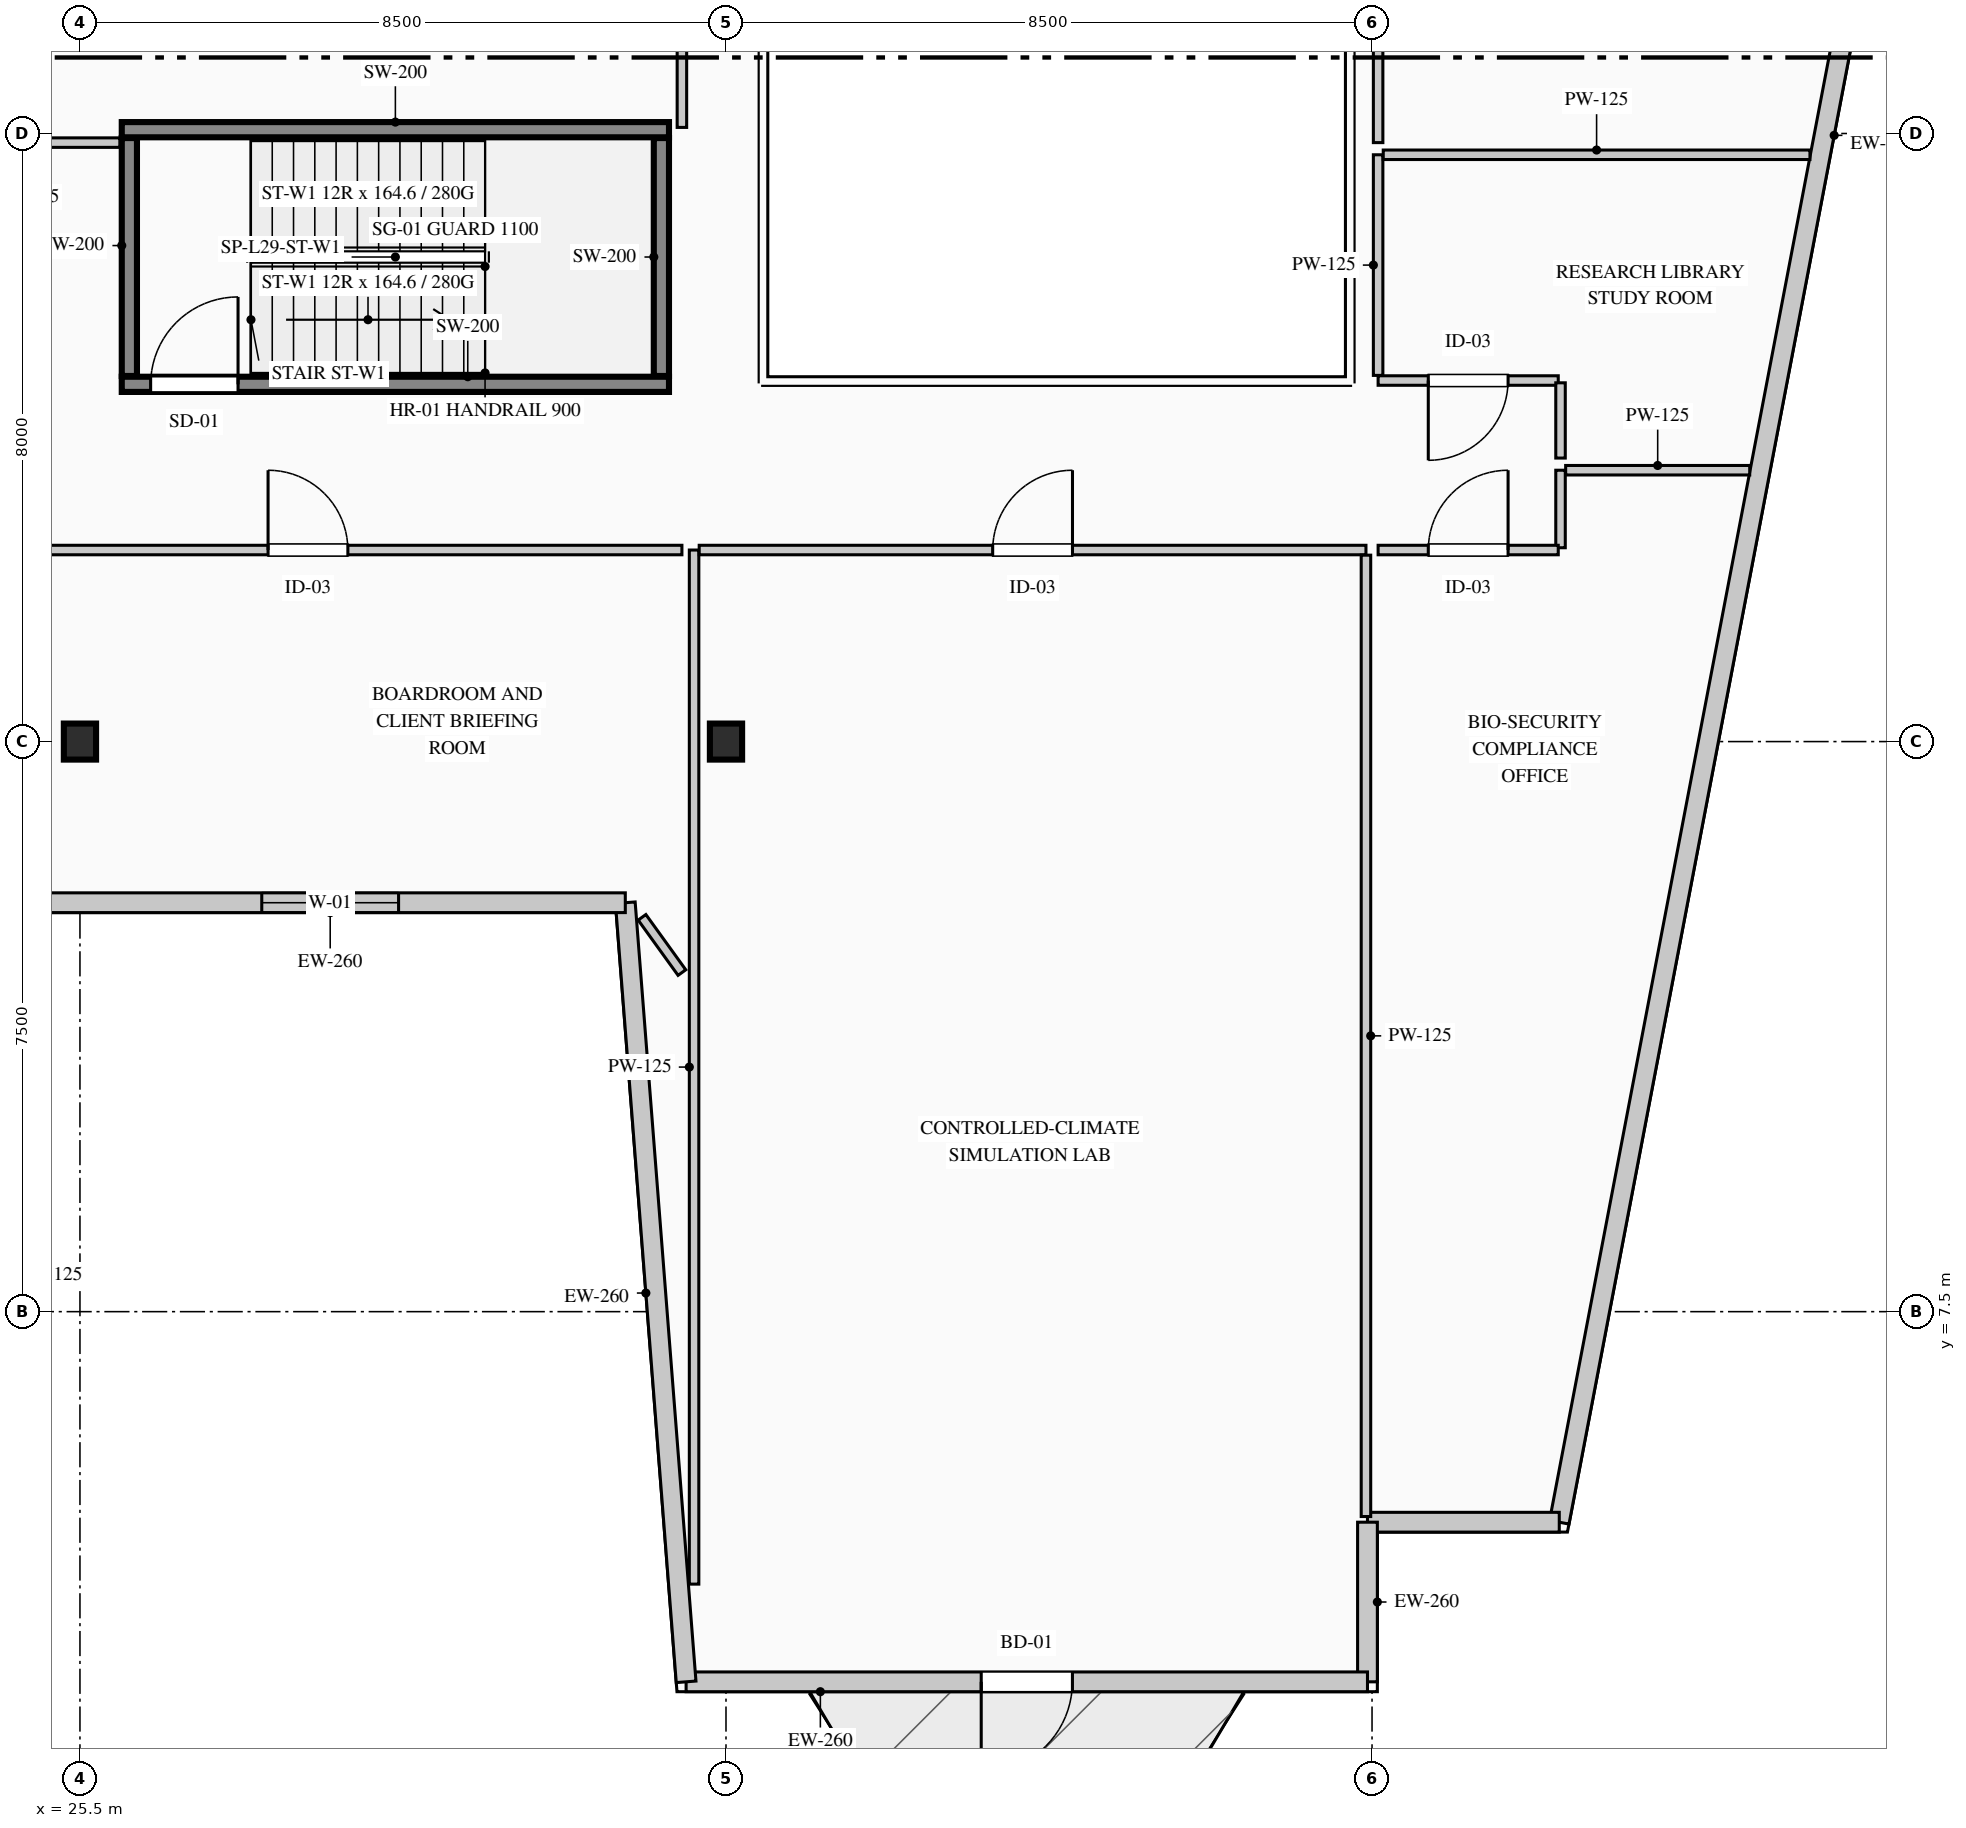
"""IFC4 building model, lengths in metres.
Left out: names, types, materials, properties, quantities, classifications, styles, units other than length and angle.
Written with IfcOpenShell. Run it as: python <this file> out.ifc"""

import sys

from ifc_helpers import new_model, si_unit, direction, frame, frame_2d, origin, origin_2d, place, context, subcontext, project, spatial, rectangle, i_section, extrude, element, fill, save


model = new_model("IFC4")
c1 = context("Model", 3, precision=1e-05, world=origin(), true_north=direction((0.0, 1.0)))
c2 = subcontext(c1, "Body", "Model", "MODEL_VIEW")
j1 = project(units=[si_unit("LENGTHUNIT", "METRE"), si_unit("PLANEANGLEUNIT", "RADIAN")], contexts=[c1])
p1 = place(None, origin())
s1 = spatial("IfcSite", under=j1, at=p1, CompositionType="ELEMENT")
p2 = place(p1, origin())
s2 = spatial("IfcBuilding", under=s1, at=p2, CompositionType="ELEMENT")
p3 = place(p2, frame((0.0, 0.0, 127.2)))
s3 = spatial("IfcBuildingStorey", under=s2, at=p3, CompositionType="ELEMENT", Elevation=127.2)
p4 = place(p3, frame((26.05, 19.7, 0.0), z_axis=(0.0, 0.0, 1.0), x_axis=(1.0, 0.0, 0.0)))
e1 = element("IfcWall", 1, at=p4, inside=s3, PredefinedType="SHEAR", context=c2, shape_type="SweptSolid", body=[
    extrude(rectangle(XDim=7.2, YDim=0.2, at=frame_2d((3.6, 0.0))), origin(), (0.0, 0.0, 1.0), 3.95),
])
p5 = place(p4, frame((0.38, 0.0, 0.0)))
e2 = element("IfcOpeningElement", 2, at=p5, cuts=e1, PredefinedType="OPENING", context=c2, shape_type="SweptSolid", body=[
    extrude(rectangle(XDim=1.15, YDim=2.2, at=frame_2d((0.575, 1.1))), frame((0.0, 0.11, 0.0), z_axis=(0.0, -1.0, 0.0), x_axis=(1.0, 0.0, 0.0)), (0.0, 0.0, 1.0), 0.22),
])
p6 = place(p3, frame((26.05, 23.05, 0.0), z_axis=(0.0, 0.0, 1.0), x_axis=(1.0, 0.0, 0.0)))
e3 = element("IfcWall", 3, at=p6, inside=s3, PredefinedType="SHEAR", context=c2, shape_type="SweptSolid", body=[
    extrude(rectangle(XDim=7.2, YDim=0.2, at=frame_2d((3.6, 0.0))), origin(), (0.0, 0.0, 1.0), 3.95),
])
for number, where, z_axis, x_axis in (
    (4, (26.15, 19.81, 0.0), (0.0, 0.0, 1.0), (0.0, 1.0, 0.0)),
    (5, (33.15, 19.81, 0.0), (0.0, 0.0, 1.0), (0.0, 1.0, 0.0)),
):
    element("IfcWall", number, at=place(p3, frame(where, z_axis=z_axis, x_axis=x_axis)), inside=s3, PredefinedType="SHEAR", context=c2, shape_type="SweptSolid", body=[
        extrude(rectangle(XDim=3.13, YDim=0.2, at=frame_2d((1.565, 0.0))), origin(), (0.0, 0.0, 1.0), 3.95),
    ])
for number, where, z_axis, x_axis in (
    (6, (25.5, 15.0, 0.0), (0.0, 0.0, 1.0), (1.0, 0.0, 0.0)),
    (7, (34.0, 15.0, 0.0), (0.0, 0.0, 1.0), (1.0, 0.0, 0.0)),
):
    element("IfcColumn", number, at=place(p3, frame(where, z_axis=z_axis, x_axis=x_axis)), inside=s3, PredefinedType="COLUMN", context=c2, shape_type="SweptSolid", body=[
        extrude(i_section(OverallWidth=0.424, OverallDepth=0.474, WebThickness=0.048, FlangeThickness=0.077, FilletRadius=0.015, at=origin_2d()), origin(), (0.0, 0.0, 1.0), 3.95),
    ])
p7 = place(p3, frame((51.942, 41.27, 0.0), z_axis=(0.0, 0.0, 1.0), x_axis=(-0.187592192405, -0.982247000173, 0.0)))
e8 = element("IfcWall", 8, at=p7, inside=s3, PredefinedType="STANDARD", context=c2, shape_type="SweptSolid", body=[
    extrude(rectangle(XDim=37.2, YDim=0.26, at=frame_2d((18.6, 0.0))), origin(), (0.0, 0.0, 1.0), 3.69),
])
p8 = place(p7, frame((12.342, 0.0, 0.9)))
e9 = element("IfcOpeningElement", 9, at=p8, cuts=e8, PredefinedType="OPENING", context=c2, shape_type="SweptSolid", body=[
    extrude(rectangle(XDim=2.1, YDim=2.0, at=frame_2d((1.05, 1.0))), frame((0.0, 0.14, 0.0), z_axis=(0.0, -1.0, 0.0), x_axis=(1.0, 0.0, 0.0)), (0.0, 0.0, 1.0), 0.28),
])
p9 = place(p3, frame((44.963, 4.73, 0.0), z_axis=(0.0, 0.0, 1.0), x_axis=(-1.0, 0.0, 0.0)))
e10 = element("IfcWall", 10, at=p9, inside=s3, PredefinedType="STANDARD", context=c2, shape_type="SweptSolid", body=[
    extrude(rectangle(XDim=2.523, YDim=0.26, at=frame_2d((1.262, 0.0))), origin(), (0.0, 0.0, 1.0), 3.69),
])
p10 = place(p3, frame((42.44, 4.73, 0.0), z_axis=(0.0, 0.0, 1.0), x_axis=(0.0, -1.0, 0.0)))
e11 = element("IfcWall", 11, at=p10, inside=s3, PredefinedType="STANDARD", context=c2, shape_type="SweptSolid", body=[
    extrude(rectangle(XDim=2.1, YDim=0.26, at=frame_2d((1.05, 0.0))), origin(), (0.0, 0.0, 1.0), 3.69),
])
p11 = place(p3, frame((42.44, 2.63, 0.0), z_axis=(0.0, 0.0, 1.0), x_axis=(-1.0, 0.0, 0.0)))
e12 = element("IfcWall", 12, at=p11, inside=s3, PredefinedType="STANDARD", context=c2, shape_type="SweptSolid", body=[
    extrude(rectangle(XDim=8.965, YDim=0.26, at=frame_2d((4.482, 0.0))), origin(), (0.0, 0.0, 1.0), 3.69),
])
p12 = place(p11, frame((3.882, 0.0, 0.0)))
e13 = element("IfcOpeningElement", 13, at=p12, cuts=e12, PredefinedType="OPENING", context=c2, shape_type="SweptSolid", body=[
    extrude(rectangle(XDim=1.2, YDim=2.2, at=frame_2d((0.6, 1.1))), frame((0.0, 0.14, 0.0), z_axis=(0.0, -1.0, 0.0), x_axis=(1.0, 0.0, 0.0)), (0.0, 0.0, 1.0), 0.28),
])
p13 = place(p3, frame((33.475, 2.63, 0.0), z_axis=(0.0, 0.0, 1.0), x_axis=(-0.077793257511, 0.996969512616, 0.0)))
e14 = element("IfcWall", 14, at=p13, inside=s3, PredefinedType="STANDARD", context=c2, shape_type="SweptSolid", body=[
    extrude(rectangle(XDim=10.281, YDim=0.26, at=frame_2d((5.141, 0.0))), origin(), (0.0, 0.0, 1.0), 3.69),
])
p14 = place(p3, frame((32.675, 12.88, 0.0), z_axis=(0.0, 0.0, 1.0), x_axis=(-1.0, 0.0, 0.0)))
e15 = element("IfcWall", 15, at=p14, inside=s3, PredefinedType="STANDARD", context=c2, shape_type="SweptSolid", body=[
    extrude(rectangle(XDim=7.765, YDim=0.26, at=frame_2d((3.883, 0.0))), origin(), (0.0, 0.0, 1.0), 3.69),
])
p15 = place(p14, frame((2.983, 0.0, 0.9)))
e16 = element("IfcOpeningElement", 16, at=p15, cuts=e15, PredefinedType="OPENING", context=c2, shape_type="SweptSolid", body=[
    extrude(rectangle(XDim=1.8, YDim=2.1, at=frame_2d((0.9, 1.05))), frame((0.0, 0.14, 0.0), z_axis=(0.0, -1.0, 0.0), x_axis=(1.0, 0.0, 0.0)), (0.0, 0.0, 1.0), 0.28),
])
p16 = place(p3, frame((33.58, 3.915, 0.0), z_axis=(0.0, 0.0, 1.0), x_axis=(0.0, 1.0, 0.0)))
e17 = element("IfcWall", 17, at=p16, inside=s3, PredefinedType="PARTITIONING", context=c2, shape_type="SweptSolid", body=[
    extrude(rectangle(XDim=13.605, YDim=0.125, at=frame_2d((6.802, 0.0))), origin(), (0.0, 0.0, 1.0), 3.69),
])
p17 = place(p3, frame((33.647, 17.52, 0.0), z_axis=(0.0, 0.0, 1.0), x_axis=(1.0, 0.0, 0.0)))
e18 = element("IfcWall", 18, at=p17, inside=s3, PredefinedType="PARTITIONING", context=c2, shape_type="SweptSolid", body=[
    extrude(rectangle(XDim=8.772, YDim=0.125, at=frame_2d((4.386, 0.0))), origin(), (0.0, 0.0, 1.0), 3.375),
])
p18 = place(p17, frame((3.861, 0.0, 0.0)))
e19 = element("IfcOpeningElement", 19, at=p18, cuts=e18, PredefinedType="OPENING", context=c2, shape_type="SweptSolid", body=[
    extrude(rectangle(XDim=1.05, YDim=2.15, at=frame_2d((0.525, 1.075))), frame((0.0, 0.073, 0.0), z_axis=(0.0, -1.0, 0.0), x_axis=(1.0, 0.0, 0.0)), (0.0, 0.0, 1.0), 0.145),
])
p19 = place(p3, frame((42.42, 17.452, 0.0), z_axis=(0.0, 0.0, 1.0), x_axis=(0.0, -1.0, 0.0)))
e20 = element("IfcWall", 20, at=p19, inside=s3, PredefinedType="PARTITIONING", context=c2, shape_type="SweptSolid", body=[
    extrude(rectangle(XDim=12.648, YDim=0.125, at=frame_2d((6.324, 0.0))), origin(), (0.0, 0.0, 1.0), 3.69),
])
p20 = place(p3, frame((44.98, 17.55, 0.0), z_axis=(0.0, 0.0, 1.0), x_axis=(0.0, 1.0, 0.0)))
e21 = element("IfcWall", 21, at=p20, inside=s3, PredefinedType="PARTITIONING", context=c2, shape_type="SweptSolid", body=[
    extrude(rectangle(XDim=1.02, YDim=0.125, at=frame_2d((0.51, 0.0))), origin(), (0.0, 0.0, 1.0), 3.69),
])
p21 = place(p3, frame((45.048, 18.57, 0.0), z_axis=(0.0, 0.0, 1.0), x_axis=(1.0, 0.0, 0.0)))
e22 = element("IfcWall", 22, at=p21, inside=s3, PredefinedType="PARTITIONING", context=c2, shape_type="SweptSolid", body=[
    extrude(rectangle(XDim=2.422, YDim=0.125, at=frame_2d((1.211, 0.0))), origin(), (0.0, 0.0, 1.0), 3.69),
])
p22 = place(p3, frame((42.58, 17.52, 0.0), z_axis=(0.0, 0.0, 1.0), x_axis=(1.0, 0.0, 0.0)))
e23 = element("IfcWall", 23, at=p22, inside=s3, PredefinedType="PARTITIONING", context=c2, shape_type="SweptSolid", body=[
    extrude(rectangle(XDim=2.37, YDim=0.125, at=frame_2d((1.185, 0.0))), origin(), (0.0, 0.0, 1.0), 3.69),
])
p23 = place(p22, frame((0.66, 0.0, 0.0)))
e24 = element("IfcOpeningElement", 24, at=p23, cuts=e23, PredefinedType="OPENING", context=c2, shape_type="SweptSolid", body=[
    extrude(rectangle(XDim=1.05, YDim=2.15, at=frame_2d((0.525, 1.075))), frame((0.0, 0.073, 0.0), z_axis=(0.0, -1.0, 0.0), x_axis=(1.0, 0.0, 0.0)), (0.0, 0.0, 1.0), 0.145),
])
p24 = place(p3, frame((33.42, 11.961, 0.0), z_axis=(0.0, 0.0, 1.0), x_axis=(-0.58517236533, 0.810908936228, 0.0)))
e25 = element("IfcWall", 25, at=p24, inside=s3, PredefinedType="PARTITIONING", context=c2, shape_type="SweptSolid", body=[
    extrude(rectangle(XDim=0.896, YDim=0.125, at=frame_2d((0.448, 0.0))), origin(), (0.0, 0.0, 1.0), 3.69),
])
p25 = place(p3, frame((23.58, 17.52, 0.0), z_axis=(0.0, 0.0, 1.0), x_axis=(1.0, 0.0, 0.0)))
e26 = element("IfcWall", 26, at=p25, inside=s3, PredefinedType="PARTITIONING", context=c2, shape_type="SweptSolid", body=[
    extrude(rectangle(XDim=9.84, YDim=0.125, at=frame_2d((4.92, 0.0))), origin(), (0.0, 0.0, 1.0), 3.375),
])
p26 = place(p25, frame((4.395, 0.0, 0.0)))
e27 = element("IfcOpeningElement", 27, at=p26, cuts=e26, PredefinedType="OPENING", context=c2, shape_type="SweptSolid", body=[
    extrude(rectangle(XDim=1.05, YDim=2.15, at=frame_2d((0.525, 1.075))), frame((0.0, 0.073, 0.0), z_axis=(0.0, -1.0, 0.0), x_axis=(1.0, 0.0, 0.0)), (0.0, 0.0, 1.0), 0.145),
])
p27 = place(p3, frame((44.95, 19.75, 0.0), z_axis=(0.0, 0.0, 1.0), x_axis=(-1.0, 0.0, 0.0)))
e28 = element("IfcWall", 28, at=p27, inside=s3, PredefinedType="PARTITIONING", context=c2, shape_type="SweptSolid", body=[
    extrude(rectangle(XDim=2.37, YDim=0.125, at=frame_2d((1.185, 0.0))), origin(), (0.0, 0.0, 1.0), 3.69),
])
p28 = place(p27, frame((0.66, 0.0, 0.0)))
e29 = element("IfcOpeningElement", 29, at=p28, cuts=e28, PredefinedType="OPENING", context=c2, shape_type="SweptSolid", body=[
    extrude(rectangle(XDim=1.05, YDim=2.15, at=frame_2d((0.525, 1.075))), frame((0.0, 0.073, 0.0), z_axis=(0.0, -1.0, 0.0), x_axis=(1.0, 0.0, 0.0)), (0.0, 0.0, 1.0), 0.145),
])
p29 = place(p3, frame((42.58, 19.817, 0.0), z_axis=(0.0, 0.0, 1.0), x_axis=(0.0, 1.0, 0.0)))
e30 = element("IfcWall", 30, at=p29, inside=s3, PredefinedType="PARTITIONING", context=c2, shape_type="SweptSolid", body=[
    extrude(rectangle(XDim=2.903, YDim=0.125, at=frame_2d((1.451, 0.0))), origin(), (0.0, 0.0, 1.0), 3.69),
])
p30 = place(p3, frame((42.647, 22.72, 0.0), z_axis=(0.0, 0.0, 1.0), x_axis=(1.0, 0.0, 0.0)))
e31 = element("IfcWall", 31, at=p30, inside=s3, PredefinedType="PARTITIONING", context=c2, shape_type="SweptSolid", body=[
    extrude(rectangle(XDim=5.614, YDim=0.125, at=frame_2d((2.807, 0.0))), origin(), (0.0, 0.0, 1.0), 3.69),
])
p31 = place(p3, frame((44.98, 18.73, 0.0), z_axis=(0.0, 0.0, 1.0), x_axis=(0.0, 1.0, 0.0)))
e32 = element("IfcWall", 32, at=p31, inside=s3, PredefinedType="PARTITIONING", context=c2, shape_type="SweptSolid", body=[
    extrude(rectangle(XDim=0.99, YDim=0.125, at=frame_2d((0.495, 0.0))), origin(), (0.0, 0.0, 1.0), 3.69),
])
p32 = place(p3, frame((26.025, 22.88, 0.0), z_axis=(0.0, 0.0, 1.0), x_axis=(-1.0, 0.0, 0.0)))
e33 = element("IfcWall", 33, at=p32, inside=s3, PredefinedType="PARTITIONING", context=c2, shape_type="SweptSolid", body=[
    extrude(rectangle(XDim=2.445, YDim=0.125, at=frame_2d((1.222, 0.0))), origin(), (0.0, 0.0, 1.0), 3.69),
])
p33 = place(p3, frame((33.42, 28.502, 0.0), z_axis=(0.0, 0.0, 1.0), x_axis=(0.0, -1.0, 0.0)))
e34 = element("IfcWall", 34, at=p33, inside=s3, PredefinedType="PARTITIONING", context=c2, shape_type="SweptSolid", body=[
    extrude(rectangle(XDim=5.422, YDim=0.125, at=frame_2d((2.711, 0.0))), origin(), (0.0, 0.0, 1.0), 3.69),
])
p34 = place(p3, frame((42.58, 22.88, 0.0), z_axis=(0.0, 0.0, 1.0), x_axis=(0.0, 1.0, 0.0)))
e35 = element("IfcWall", 35, at=p34, inside=s3, PredefinedType="PARTITIONING", context=c2, shape_type="SweptSolid", body=[
    extrude(rectangle(XDim=5.729, YDim=0.125, at=frame_2d((2.865, 0.0))), origin(), (0.0, 0.0, 1.0), 3.69),
])
p35 = place(p12, origin())
e36 = element("IfcDoor", 36, at=p35, inside=s3, OperationType="SINGLE_SWING_RIGHT", PredefinedType="DOOR", context=c2, shape_type="SweptSolid", body=[
    extrude(rectangle(XDim=1.2, YDim=2.2, at=frame_2d((0.6, 1.1))), frame((0.0, 0.025, 0.0), z_axis=(0.0, -1.0, 0.0), x_axis=(1.0, 0.0, 0.0)), (0.0, 0.0, 1.0), 0.05),
])
fill(e13, e36)
p36 = place(p15, origin())
e37 = element("IfcWindow", 37, at=p36, inside=s3, PartitioningType="SINGLE_PANEL", PredefinedType="WINDOW", context=c2, shape_type="SweptSolid", body=[
    extrude(rectangle(XDim=1.8, YDim=2.1, at=frame_2d((0.9, 1.05))), frame((0.0, 0.03, 0.0), z_axis=(0.0, -1.0, 0.0), x_axis=(1.0, 0.0, 0.0)), (0.0, 0.0, 1.0), 0.06),
])
fill(e16, e37)
p37 = place(p5, origin())
e38 = element("IfcDoor", 38, at=p37, inside=s3, OperationType="SINGLE_SWING_RIGHT", PredefinedType="DOOR", context=c2, shape_type="SweptSolid", body=[
    extrude(rectangle(XDim=1.15, YDim=2.2, at=frame_2d((0.575, 1.1))), frame((0.0, 0.025, 0.0), z_axis=(0.0, -1.0, 0.0), x_axis=(1.0, 0.0, 0.0)), (0.0, 0.0, 1.0), 0.05),
])
fill(e2, e38)
p38 = place(p18, origin())
e39 = element("IfcDoor", 39, at=p38, inside=s3, OperationType="SINGLE_SWING_RIGHT", PredefinedType="DOOR", context=c2, shape_type="SweptSolid", body=[
    extrude(rectangle(XDim=1.05, YDim=2.15, at=frame_2d((0.525, 1.075))), frame((0.0, 0.025, 0.0), z_axis=(0.0, -1.0, 0.0), x_axis=(1.0, 0.0, 0.0)), (0.0, 0.0, 1.0), 0.05),
])
fill(e19, e39)
p39 = place(p23, origin())
e40 = element("IfcDoor", 40, at=p39, inside=s3, OperationType="SINGLE_SWING_RIGHT", PredefinedType="DOOR", context=c2, shape_type="SweptSolid", body=[
    extrude(rectangle(XDim=1.05, YDim=2.15, at=frame_2d((0.525, 1.075))), frame((0.0, 0.025, 0.0), z_axis=(0.0, -1.0, 0.0), x_axis=(1.0, 0.0, 0.0)), (0.0, 0.0, 1.0), 0.05),
])
fill(e24, e40)
p40 = place(p26, origin())
e41 = element("IfcDoor", 41, at=p40, inside=s3, OperationType="SINGLE_SWING_LEFT", PredefinedType="DOOR", context=c2, shape_type="SweptSolid", body=[
    extrude(rectangle(XDim=1.05, YDim=2.15, at=frame_2d((0.525, 1.075))), frame((0.0, 0.025, 0.0), z_axis=(0.0, -1.0, 0.0), x_axis=(1.0, 0.0, 0.0)), (0.0, 0.0, 1.0), 0.05),
])
fill(e27, e41)
p41 = place(p28, origin())
e42 = element("IfcDoor", 42, at=p41, inside=s3, OperationType="SINGLE_SWING_RIGHT", PredefinedType="DOOR", context=c2, shape_type="SweptSolid", body=[
    extrude(rectangle(XDim=1.05, YDim=2.15, at=frame_2d((0.525, 1.075))), frame((0.0, 0.025, 0.0), z_axis=(0.0, -1.0, 0.0), x_axis=(1.0, 0.0, 0.0)), (0.0, 0.0, 1.0), 0.05),
])
fill(e29, e42)
save(model, sys.argv[1])
